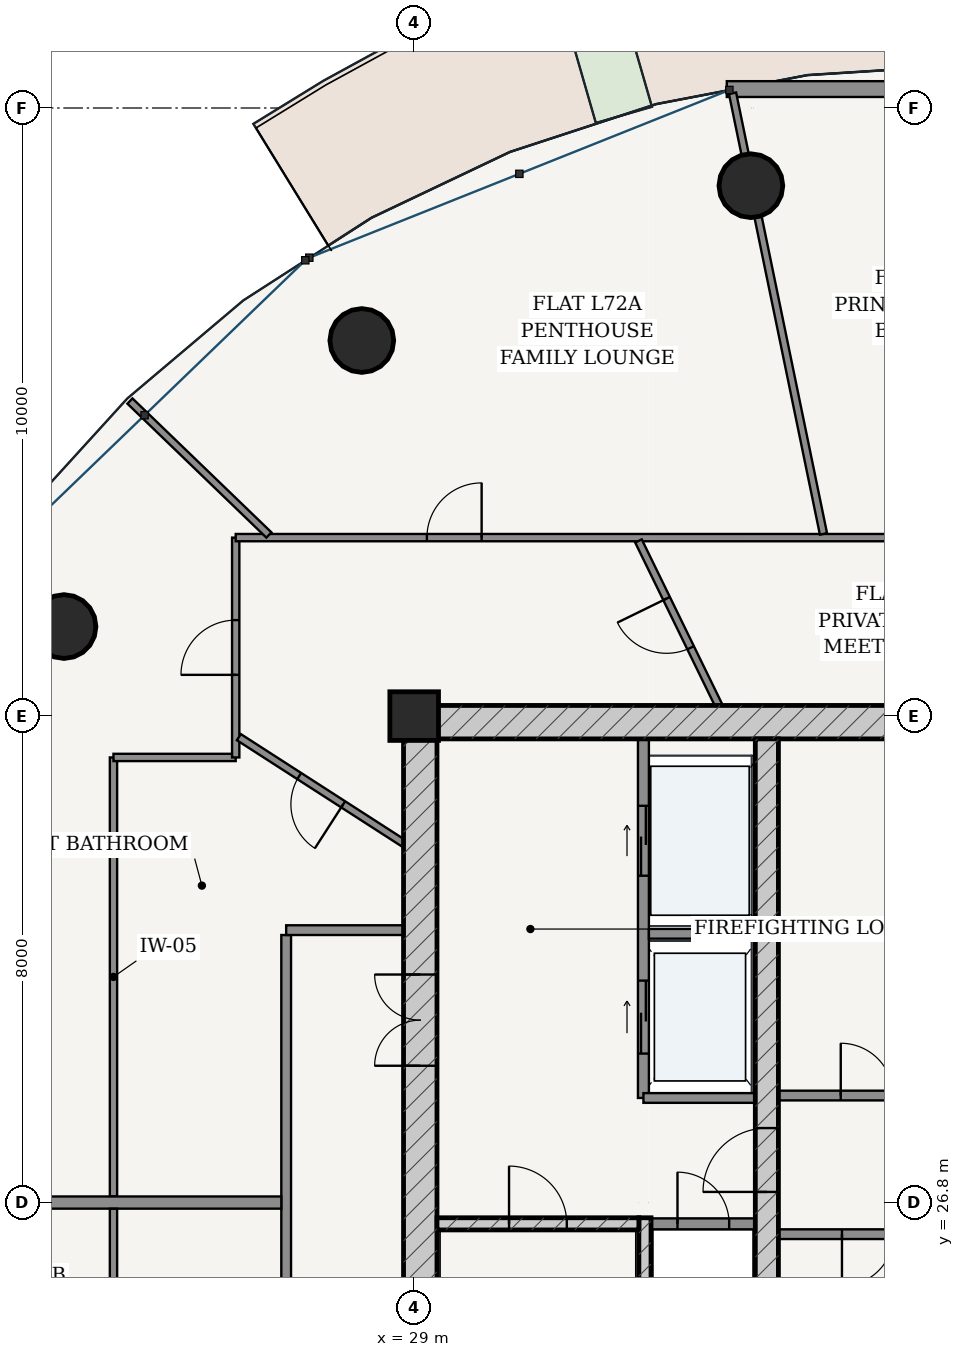
"""IFC4 building model, lengths in metres.
Left out: names, types, materials, properties, quantities, classifications, styles, units other than length and angle.
Written with IfcOpenShell. Run it as: python <this file> out.ifc"""

import sys

from ifc_helpers import new_model, si_unit, direction, frame, frame_2d, origin, origin_2d, place, context, subcontext, project, spatial, rectangle, hollow_circle, extrude, source, transform, mapped, element, fill, save


model = new_model("IFC4")
c1 = context("Model", 3, precision=1e-05, world=origin(), true_north=direction((-0.2419218956, 0.970295726276)))
c2 = subcontext(c1, "Body", "Model", "MODEL_VIEW")
j1 = project(units=[si_unit("LENGTHUNIT", "METRE"), si_unit("PLANEANGLEUNIT", "RADIAN")], contexts=[c1])
p1 = place(None, origin())
s1 = spatial("IfcSite", under=j1, at=p1, CompositionType="ELEMENT")
p2 = place(p1, origin())
s2 = spatial("IfcBuilding", under=s1, at=p2, CompositionType="ELEMENT")
p3 = place(p2, frame((0.0, 0.0, 274.45)))
s3 = spatial("IfcBuildingStorey", under=s2, at=p3, CompositionType="ELEMENT", Elevation=274.45)
p4 = place(p3, frame((29.0, 34.8, 0.0), z_axis=(0.0, 0.0, 1.0), x_axis=(1.0, 0.0, 0.0)))
e1 = element("IfcColumn", 1, at=p4, inside=s3, PredefinedType="COLUMN", context=c2, shape_type="SweptSolid", body=[
    extrude(rectangle(XDim=0.8, YDim=0.8, at=origin_2d()), origin(), (0.0, 0.0, 1.0), 3.75),
])
p5 = place(p3, frame((28.825, 34.7, 0.0), z_axis=(0.0, 0.0, 1.0), x_axis=(1.0, 0.0, 0.0)))
e2 = element("IfcWall", 2, at=p5, inside=s3, PredefinedType="SHEAR", context=c2, shape_type="SweptSolid", body=[
    extrude(rectangle(XDim=18.35, YDim=0.55, at=frame_2d((9.175, 0.0))), origin(), (0.0, 0.0, 1.0), 3.49),
])
p6 = place(p3, frame((29.1, 19.175, 0.0), z_axis=(0.0, 0.0, 1.0), x_axis=(0.0, 1.0, 0.0)))
e3 = element("IfcWall", 3, at=p6, inside=s3, PredefinedType="SHEAR", context=c2, shape_type="SweptSolid", body=[
    extrude(rectangle(XDim=15.25, YDim=0.55, at=frame_2d((7.625, 0.0))), origin(), (0.0, 0.0, 1.0), 3.49),
])
p7 = place(p6, frame((9.875, 0.0, 0.0)))
e4 = element("IfcOpeningElement", 4, at=p7, cuts=e3, PredefinedType="OPENING", context=c2, shape_type="SweptSolid", body=[
    extrude(rectangle(XDim=1.5, YDim=2.2, at=frame_2d((0.75, 1.1))), frame((0.0, 0.285, 0.0), z_axis=(0.0, -1.0, 0.0), x_axis=(1.0, 0.0, 0.0)), (0.0, 0.0, 1.0), 0.57),
])
p8 = place(p3, frame((32.795, 19.175, 0.0), z_axis=(0.0, 0.0, 1.0), x_axis=(0.0, 1.0, 0.0)))
e5 = element("IfcWall", 5, at=p8, inside=s3, PredefinedType="SOLIDWALL", context=c2, shape_type="SweptSolid", body=[
    extrude(rectangle(XDim=7.375, YDim=0.2, at=frame_2d((3.688, 0.0))), origin(), (0.0, 0.0, 1.0), 3.49),
])
p9 = place(p3, frame((29.375, 26.45, 0.0), z_axis=(0.0, 0.0, 1.0), x_axis=(1.0, 0.0, 0.0)))
e6 = element("IfcWall", 6, at=p9, inside=s3, PredefinedType="SOLIDWALL", context=c2, shape_type="SweptSolid", body=[
    extrude(rectangle(XDim=3.32, YDim=0.2, at=frame_2d((1.66, 0.0))), origin(), (0.0, 0.0, 1.0), 3.49),
])
p10 = place(p9, frame((1.185, 0.0, 0.0)))
e7 = element("IfcOpeningElement", 7, at=p10, cuts=e6, PredefinedType="OPENING", context=c2, shape_type="SweptSolid", body=[
    extrude(rectangle(XDim=0.95, YDim=2.15, at=frame_2d((0.475, 1.075))), frame((0.0, 0.11, 0.0), z_axis=(0.0, -1.0, 0.0), x_axis=(1.0, 0.0, 0.0)), (0.0, 0.0, 1.0), 0.22),
])
p11 = place(p3, frame((34.8, 19.175, 0.0), z_axis=(0.0, 0.0, 1.0), x_axis=(0.0, 1.0, 0.0)))
e8 = element("IfcWall", 8, at=p11, inside=s3, PredefinedType="SHEAR", context=c2, shape_type="SweptSolid", body=[
    extrude(rectangle(XDim=15.25, YDim=0.38, at=frame_2d((7.625, 0.0))), origin(), (0.0, 0.0, 1.0), 3.49),
])
p12 = place(p11, frame((7.8, 0.0, 0.0)))
e9 = element("IfcOpeningElement", 9, at=p12, cuts=e8, PredefinedType="OPENING", context=c2, shape_type="SweptSolid", body=[
    extrude(rectangle(XDim=1.05, YDim=2.15, at=frame_2d((0.525, 1.075))), frame((0.0, 0.2, 0.0), z_axis=(0.0, -1.0, 0.0), x_axis=(1.0, 0.0, 0.0)), (0.0, 0.0, 1.0), 0.4),
])
for number, where, z_axis, x_axis in (
    (10, (34.537, 43.522, 0.0), (0.0, 0.0, 1.0), (1.0, 0.0, 0.0)),
    (11, (28.139, 40.977, 0.0), (0.0, 0.0, 1.0), (1.0, 0.0, 0.0)),
    (12, (23.241, 36.272, 0.0), (0.0, 0.0, 1.0), (1.0, 0.0, 0.0)),
):
    element("IfcColumn", number, at=place(p3, frame(where, z_axis=z_axis, x_axis=x_axis)), inside=s3, PredefinedType="COLUMN", context=c2, shape_type="SweptSolid", body=[
        extrude(hollow_circle(Radius=0.525, WallThickness=0.035, at=origin_2d()), origin(), (0.0, 0.0, 1.0), 3.75),
    ])
p13 = place(p3, frame((41.859, 45.111, 0.0), z_axis=(0.0, 0.0, 1.0), x_axis=(-1.0, 0.0, 0.0)))
e13 = element("IfcWall", 13, at=p13, inside=s3, PredefinedType="SOLIDWALL", context=c2, shape_type="SweptSolid", body=[
    extrude(rectangle(XDim=7.718, YDim=0.26, at=frame_2d((3.859, 0.0))), origin(), (0.0, 0.0, 1.0), 3.49),
])
p14 = place(p13, frame((3.184, 0.0, 0.0)))
e14 = element("IfcOpeningElement", 14, at=p14, cuts=e13, PredefinedType="OPENING", context=c2, shape_type="SweptSolid", body=[
    extrude(rectangle(XDim=1.35, YDim=2.2, at=frame_2d((0.675, 1.1))), frame((0.0, 0.14, 0.0), z_axis=(0.0, -1.0, 0.0), x_axis=(1.0, 0.0, 0.0)), (0.0, 0.0, 1.0), 0.28),
])
p15 = place(p3, frame((32.9, 26.45, 0.0), z_axis=(0.0, 0.0, 1.0), x_axis=(1.0, 0.0, 0.0)))
e15 = element("IfcWall", 15, at=p15, inside=s3, PredefinedType="PARTITIONING", context=c2, shape_type="SweptSolid", body=[
    extrude(rectangle(XDim=1.71, YDim=0.18, at=frame_2d((0.855, 0.0))), origin(), (0.0, 0.0, 1.0), 3.49),
])
p16 = place(p15, frame((0.43, 0.0, 0.0)))
e16 = element("IfcOpeningElement", 16, at=p16, cuts=e15, PredefinedType="OPENING", context=c2, shape_type="SweptSolid", body=[
    extrude(rectangle(XDim=0.85, YDim=2.1, at=frame_2d((0.425, 1.05))), frame((0.0, 0.1, 0.0), z_axis=(0.0, -1.0, 0.0), x_axis=(1.0, 0.0, 0.0)), (0.0, 0.0, 1.0), 0.2),
])
p17 = place(p3, frame((32.77, 28.52, 0.0), z_axis=(0.0, 0.0, 1.0), x_axis=(0.0, 1.0, 0.0)))
e17 = element("IfcWall", 17, at=p17, inside=s3, PredefinedType="PARTITIONING", context=c2, shape_type="SweptSolid", body=[
    extrude(rectangle(XDim=5.905, YDim=0.18, at=frame_2d((2.953, 0.0))), origin(), (0.0, 0.0, 1.0), 3.49),
])
p18 = place(p17, frame((3.655, 0.0, 0.0)))
e18 = element("IfcOpeningElement", 18, at=p18, cuts=e17, PredefinedType="OPENING", context=c2, shape_type="SweptSolid", body=[
    extrude(rectangle(XDim=1.15, YDim=2.2, at=frame_2d((0.575, 1.1))), frame((0.0, 0.1, 0.0), z_axis=(0.0, -1.0, 0.0), x_axis=(1.0, 0.0, 0.0)), (0.0, 0.0, 1.0), 0.2),
])
p19 = place(p17, frame((0.73, 0.0, 0.0)))
e19 = element("IfcOpeningElement", 19, at=p19, cuts=e17, PredefinedType="OPENING", context=c2, shape_type="SweptSolid", body=[
    extrude(rectangle(XDim=1.2, YDim=2.25, at=frame_2d((0.6, 1.125))), frame((0.0, 0.1, 0.0), z_axis=(0.0, -1.0, 0.0), x_axis=(1.0, 0.0, 0.0)), (0.0, 0.0, 1.0), 0.2),
])
p20 = place(p3, frame((32.86, 31.22, 0.0), z_axis=(0.0, 0.0, 1.0), x_axis=(1.0, 0.0, 0.0)))
e20 = element("IfcWall", 20, at=p20, inside=s3, PredefinedType="PARTITIONING", context=c2, shape_type="SweptSolid", body=[
    extrude(rectangle(XDim=1.75, YDim=0.16, at=frame_2d((0.875, 0.0))), origin(), (0.0, 0.0, 1.0), 3.49),
])
p21 = place(p3, frame((32.77, 28.52, 0.0), z_axis=(0.0, 0.0, 1.0), x_axis=(1.0, 0.0, 0.0)))
e21 = element("IfcWall", 21, at=p21, inside=s3, PredefinedType="PARTITIONING", context=c2, shape_type="SweptSolid", body=[
    extrude(rectangle(XDim=1.84, YDim=0.16, at=frame_2d((0.92, 0.0))), origin(), (0.0, 0.0, 1.0), 3.49),
])
p22 = place(p3, frame((34.99, 28.56, 0.0), z_axis=(0.0, 0.0, 1.0), x_axis=(1.0, 0.0, 0.0)))
e22 = element("IfcWall", 22, at=p22, inside=s3, PredefinedType="PARTITIONING", context=c2, shape_type="SweptSolid", body=[
    extrude(rectangle(XDim=6.02, YDim=0.16, at=frame_2d((3.01, 0.0))), origin(), (0.0, 0.0, 1.0), 3.49),
])
p23 = place(p22, frame((1.025, 0.0, 0.0)))
e23 = element("IfcOpeningElement", 23, at=p23, cuts=e22, PredefinedType="OPENING", context=c2, shape_type="SweptSolid", body=[
    extrude(rectangle(XDim=0.86, YDim=2.1, at=frame_2d((0.43, 1.05))), frame((0.0, 0.09, 0.0), z_axis=(0.0, -1.0, 0.0), x_axis=(1.0, 0.0, 0.0)), (0.0, 0.0, 1.0), 0.18),
])
p24 = place(p22, frame((4.14, 0.0, 0.0)))
e24 = element("IfcOpeningElement", 24, at=p24, cuts=e22, PredefinedType="OPENING", context=c2, shape_type="SweptSolid", body=[
    extrude(rectangle(XDim=0.85, YDim=2.1, at=frame_2d((0.425, 1.05))), frame((0.0, 0.09, 0.0), z_axis=(0.0, -1.0, 0.0), x_axis=(1.0, 0.0, 0.0)), (0.0, 0.0, 1.0), 0.18),
])
p25 = place(p3, frame((34.99, 26.28, 0.0), z_axis=(0.0, 0.0, 1.0), x_axis=(1.0, 0.0, 0.0)))
e25 = element("IfcWall", 25, at=p25, inside=s3, PredefinedType="PARTITIONING", context=c2, shape_type="SweptSolid", body=[
    extrude(rectangle(XDim=6.02, YDim=0.16, at=frame_2d((3.01, 0.0))), origin(), (0.0, 0.0, 1.0), 3.49),
])
p26 = place(p25, frame((1.045, 0.0, 0.0)))
e26 = element("IfcOpeningElement", 26, at=p26, cuts=e25, PredefinedType="OPENING", context=c2, shape_type="SweptSolid", body=[
    extrude(rectangle(XDim=0.85, YDim=2.1, at=frame_2d((0.425, 1.05))), frame((0.0, 0.09, 0.0), z_axis=(0.0, -1.0, 0.0), x_axis=(1.0, 0.0, 0.0)), (0.0, 0.0, 1.0), 0.18),
])
p27 = place(p25, frame((3.215, 0.0, 0.0)))
e27 = element("IfcOpeningElement", 27, at=p27, cuts=e25, PredefinedType="OPENING", context=c2, shape_type="SweptSolid", body=[
    extrude(rectangle(XDim=1.1, YDim=2.2, at=frame_2d((0.55, 1.1))), frame((0.0, 0.09, 0.0), z_axis=(0.0, -1.0, 0.0), x_axis=(1.0, 0.0, 0.0)), (0.0, 0.0, 1.0), 0.18),
])
p28 = place(p25, frame((4.695, 0.0, 0.0)))
e28 = element("IfcOpeningElement", 28, at=p28, cuts=e25, PredefinedType="OPENING", context=c2, shape_type="SweptSolid", body=[
    extrude(rectangle(XDim=1.1, YDim=2.2, at=frame_2d((0.55, 1.1))), frame((0.0, 0.09, 0.0), z_axis=(0.0, -1.0, 0.0), x_axis=(1.0, 0.0, 0.0)), (0.0, 0.0, 1.0), 0.18),
])
p29 = place(p3, frame((26.895, 17.275, 0.0), z_axis=(0.0, 0.0, 1.0), x_axis=(0.0, 1.0, 0.0)))
e29 = element("IfcWall", 29, at=p29, inside=s3, PredefinedType="PARTITIONING", context=c2, shape_type="SweptSolid", body=[
    extrude(rectangle(XDim=13.925, YDim=0.16, at=frame_2d((6.962, 0.0))), origin(), (0.0, 0.0, 1.0), 3.015),
])
p30 = place(p29, frame((2.735, 0.0, 0.0)))
e30 = element("IfcOpeningElement", 30, at=p30, cuts=e29, PredefinedType="OPENING", context=c2, shape_type="SweptSolid", body=[
    extrude(rectangle(XDim=0.98, YDim=2.2, at=frame_2d((0.49, 1.1))), frame((0.0, 0.09, 0.0), z_axis=(0.0, -1.0, 0.0), x_axis=(1.0, 0.0, 0.0)), (0.0, 0.0, 1.0), 0.18),
])
p31 = place(p3, frame((26.895, 31.28, 0.0), z_axis=(0.0, 0.0, 1.0), x_axis=(1.0, 0.0, 0.0)))
e31 = element("IfcWall", 31, at=p31, inside=s3, PredefinedType="PARTITIONING", context=c2, shape_type="SweptSolid", body=[
    extrude(rectangle(XDim=1.93, YDim=0.16, at=frame_2d((0.965, 0.0))), origin(), (0.0, 0.0, 1.0), 3.49),
])
p32 = place(p3, frame((24.055, 26.902, 0.0), z_axis=(0.0, 0.0, 1.0), x_axis=(0.0, 1.0, 0.0)))
e32 = element("IfcWall", 32, at=p32, inside=s3, PredefinedType="PARTITIONING", context=c2, shape_type="SweptSolid", body=[
    extrude(rectangle(XDim=7.218, YDim=0.12, at=frame_2d((3.609, 0.0))), origin(), (0.0, 0.0, 1.0), 3.015),
])
p33 = place(p3, frame((24.055, 34.12, 0.0), z_axis=(0.0, 0.0, 1.0), x_axis=(1.0, 0.0, 0.0)))
e33 = element("IfcWall", 33, at=p33, inside=s3, PredefinedType="PARTITIONING", context=c2, shape_type="SweptSolid", body=[
    extrude(rectangle(XDim=2.01, YDim=0.12, at=frame_2d((1.005, 0.0))), origin(), (0.0, 0.0, 1.0), 3.209),
])
p34 = place(p3, frame((26.065, 34.12, 0.0), z_axis=(0.0, 0.0, 1.0), x_axis=(0.0, 1.0, 0.0)))
e34 = element("IfcWall", 34, at=p34, inside=s3, PredefinedType="PARTITIONING", context=c2, shape_type="SweptSolid", body=[
    extrude(rectangle(XDim=3.615, YDim=0.12, at=frame_2d((1.808, 0.0))), origin(), (0.0, 0.0, 1.0), 3.015),
])
p35 = place(p34, frame((1.358, 0.0, 0.0)))
e35 = element("IfcOpeningElement", 35, at=p35, cuts=e34, PredefinedType="OPENING", context=c2, shape_type="SweptSolid", body=[
    extrude(rectangle(XDim=0.9, YDim=2.15, at=frame_2d((0.45, 1.075))), frame((0.0, 0.07, 0.0), z_axis=(0.0, -1.0, 0.0), x_axis=(1.0, 0.0, 0.0)), (0.0, 0.0, 1.0), 0.14),
])
p36 = place(p3, frame((26.065, 37.735, 0.0), z_axis=(0.0, 0.0, 1.0), x_axis=(1.0, 0.0, 0.0)))
e36 = element("IfcWall", 36, at=p36, inside=s3, PredefinedType="PARTITIONING", context=c2, shape_type="SweptSolid", body=[
    extrude(rectangle(XDim=23.87, YDim=0.12, at=frame_2d((11.935, 0.0))), origin(), (0.0, 0.0, 1.0), 3.015),
])
p37 = place(p36, frame((18.46, 0.0, 0.0)))
e37 = element("IfcOpeningElement", 37, at=p37, cuts=e36, PredefinedType="OPENING", context=c2, shape_type="SweptSolid", body=[
    extrude(rectangle(XDim=0.9, YDim=2.15, at=frame_2d((0.45, 1.075))), frame((0.0, 0.07, 0.0), z_axis=(0.0, -1.0, 0.0), x_axis=(1.0, 0.0, 0.0)), (0.0, 0.0, 1.0), 0.14),
])
p38 = place(p36, frame((3.144, 0.0, 0.0)))
e38 = element("IfcOpeningElement", 38, at=p38, cuts=e36, PredefinedType="OPENING", context=c2, shape_type="SweptSolid", body=[
    extrude(rectangle(XDim=0.9, YDim=2.15, at=frame_2d((0.45, 1.075))), frame((0.0, 0.07, 0.0), z_axis=(0.0, -1.0, 0.0), x_axis=(1.0, 0.0, 0.0)), (0.0, 0.0, 1.0), 0.14),
])
p39 = place(p3, frame((35.731, 37.796, 0.0), z_axis=(0.0, 0.0, 1.0), x_axis=(-0.202101574245, 0.979364566281, 0.0)))
e39 = element("IfcWall", 39, at=p39, inside=s3, PredefinedType="PARTITIONING", context=c2, shape_type="SweptSolid", body=[
    extrude(rectangle(XDim=7.4, YDim=0.12, at=frame_2d((3.7, 0.0))), origin(), (0.0, 0.0, 1.0), 3.015),
])
p40 = place(p3, frame((26.611, 37.778, 0.0), z_axis=(0.0, 0.0, 1.0), x_axis=(-0.719985652574, 0.693988948102, 0.0)))
e40 = element("IfcWall", 40, at=p40, inside=s3, PredefinedType="PARTITIONING", context=c2, shape_type="SweptSolid", body=[
    extrude(rectangle(XDim=3.174, YDim=0.12, at=frame_2d((1.587, 0.0))), origin(), (0.0, 0.0, 1.0), 3.121),
])
p41 = place(p3, frame((34.008, 34.977, 0.0), z_axis=(0.0, 0.0, 1.0), x_axis=(-0.438717914863, 0.898624833386, 0.0)))
e41 = element("IfcWall", 41, at=p41, inside=s3, PredefinedType="PARTITIONING", context=c2, shape_type="SweptSolid", body=[
    extrude(rectangle(XDim=3.007, YDim=0.12, at=frame_2d((1.504, 0.0))), origin(), (0.0, 0.0, 1.0), 3.49),
])
p42 = place(p41, frame((1.054, 0.0, 0.0)))
e42 = element("IfcOpeningElement", 42, at=p42, cuts=e41, PredefinedType="OPENING", context=c2, shape_type="SweptSolid", body=[
    extrude(rectangle(XDim=0.9, YDim=2.15, at=frame_2d((0.45, 1.075))), frame((0.0, 0.07, 0.0), z_axis=(0.0, -1.0, 0.0), x_axis=(1.0, 0.0, 0.0)), (0.0, 0.0, 1.0), 0.14),
])
p43 = place(p3, frame((28.825, 32.709, 0.0), z_axis=(0.0, 0.0, 1.0), x_axis=(-0.840692964871, 0.541512085568, 0.0)))
e43 = element("IfcWall", 43, at=p43, inside=s3, PredefinedType="PARTITIONING", context=c2, shape_type="SweptSolid", body=[
    extrude(rectangle(XDim=3.221, YDim=0.12, at=frame_2d((1.61, 0.0))), origin(), (0.0, 0.0, 1.0), 3.015),
])
p44 = place(p43, frame((1.18, 0.0, 0.0)))
e44 = element("IfcOpeningElement", 44, at=p44, cuts=e43, PredefinedType="OPENING", context=c2, shape_type="SweptSolid", body=[
    extrude(rectangle(XDim=0.86, YDim=2.15, at=frame_2d((0.43, 1.075))), frame((0.0, 0.07, 0.0), z_axis=(0.0, -1.0, 0.0), x_axis=(1.0, 0.0, 0.0)), (0.0, 0.0, 1.0), 0.14),
])
p45 = place(p3, frame((26.815, 26.8, 0.0), z_axis=(0.0, 0.0, 1.0), x_axis=(-1.0, 0.0, 0.0)))
e45 = element("IfcWall", 45, at=p45, inside=s3, PredefinedType="PARTITIONING", context=c2, shape_type="SweptSolid", body=[
    extrude(rectangle(XDim=8.155, YDim=0.2, at=frame_2d((4.078, 0.0))), origin(), (0.0, 0.0, 1.0), 3.121),
])
p46 = place(p3, frame((24.055, 14.355, 0.0), z_axis=(0.0, 0.0, 1.0), x_axis=(0.0, 1.0, 0.0)))
e46 = element("IfcWall", 46, at=p46, inside=s3, PredefinedType="PARTITIONING", context=c2, shape_type="SweptSolid", body=[
    extrude(rectangle(XDim=12.343, YDim=0.12, at=frame_2d((6.171, 0.0))), origin(), (0.0, 0.0, 1.0), 3.015),
])
p47 = place(p46, frame((5.442, 0.0, 0.0)))
e47 = element("IfcOpeningElement", 47, at=p47, cuts=e46, PredefinedType="OPENING", context=c2, shape_type="SweptSolid", body=[
    extrude(rectangle(XDim=0.9, YDim=2.15, at=frame_2d((0.45, 1.075))), frame((0.0, 0.07, 0.0), z_axis=(0.0, -1.0, 0.0), x_axis=(1.0, 0.0, 0.0)), (0.0, 0.0, 1.0), 0.14),
])
m1 = source(origin(), c2, "Body", "SweptSolid", [
    extrude(rectangle(XDim=1.5, YDim=2.2, at=frame_2d((0.75, 1.1))), frame((0.0, 0.025, 0.0), z_axis=(0.0, -1.0, 0.0), x_axis=(1.0, 0.0, 0.0)), (0.0, 0.0, 1.0), 0.05),
])
p48 = place(p7, origin())
e48 = element("IfcDoor", 48, at=p48, inside=s3, OperationType="DOUBLE_DOOR_SINGLE_SWING", PredefinedType="DOOR", context=c2, shape_type="MappedRepresentation", body=[
    mapped(m1, transform((0.0, 0.0, 0.0), scale=1.0)),
])
fill(e4, e48)
m2 = source(origin(), c2, "Body", "SweptSolid", [
    extrude(rectangle(XDim=1.05, YDim=2.15, at=frame_2d((0.525, 1.075))), frame((0.0, 0.025, 0.0), z_axis=(0.0, -1.0, 0.0), x_axis=(1.0, 0.0, 0.0)), (0.0, 0.0, 1.0), 0.05),
])
p49 = place(p12, origin())
e49 = element("IfcDoor", 49, at=p49, inside=s3, OperationType="SINGLE_SWING_LEFT", PredefinedType="DOOR", context=c2, shape_type="MappedRepresentation", body=[
    mapped(m2, transform((0.0, 0.0, 0.0), scale=1.0)),
])
fill(e9, e49)
m3 = source(origin(), c2, "Body", "SweptSolid", [
    extrude(rectangle(XDim=0.95, YDim=2.15, at=frame_2d((0.475, 1.075))), frame((0.0, 0.025, 0.0), z_axis=(0.0, -1.0, 0.0), x_axis=(1.0, 0.0, 0.0)), (0.0, 0.0, 1.0), 0.05),
])
p50 = place(p10, origin())
e50 = element("IfcDoor", 50, at=p50, inside=s3, OperationType="SINGLE_SWING_LEFT", PredefinedType="DOOR", context=c2, shape_type="MappedRepresentation", body=[
    mapped(m3, transform((0.0, 0.0, 0.0), scale=1.0)),
])
fill(e7, e50)
m4 = source(origin(), c2, "Body", "SweptSolid", [
    extrude(rectangle(XDim=0.85, YDim=2.1, at=frame_2d((0.425, 1.05))), frame((0.0, 0.025, 0.0), z_axis=(0.0, -1.0, 0.0), x_axis=(1.0, 0.0, 0.0)), (0.0, 0.0, 1.0), 0.05),
])
p51 = place(p16, origin())
e51 = element("IfcDoor", 51, at=p51, inside=s3, OperationType="SINGLE_SWING_LEFT", PredefinedType="DOOR", context=c2, shape_type="MappedRepresentation", body=[
    mapped(m4, transform((0.0, 0.0, 0.0), scale=1.0)),
])
fill(e16, e51)
m5 = source(origin(), c2, "Body", "SweptSolid", [
    extrude(rectangle(XDim=0.86, YDim=2.1, at=frame_2d((0.43, 1.05))), frame((0.0, 0.025, 0.0), z_axis=(0.0, -1.0, 0.0), x_axis=(1.0, 0.0, 0.0)), (0.0, 0.0, 1.0), 0.05),
])
p52 = place(p23, origin())
e52 = element("IfcDoor", 52, at=p52, inside=s3, OperationType="SINGLE_SWING_LEFT", PredefinedType="DOOR", context=c2, shape_type="MappedRepresentation", body=[
    mapped(m5, transform((0.0, 0.0, 0.0), scale=1.0)),
])
fill(e23, e52)
p53 = place(p26, frame((0.85, 0.0, 0.0), z_axis=(0.0, 0.0, 1.0), x_axis=(-1.0, 0.0, 0.0)))
e53 = element("IfcDoor", 53, at=p53, inside=s3, OperationType="SINGLE_SWING_RIGHT", PredefinedType="DOOR", context=c2, shape_type="MappedRepresentation", body=[
    mapped(m4, transform((0.0, 0.0, 0.0), scale=1.0)),
])
fill(e26, e53)
m6 = source(origin(), c2, "Body", "SweptSolid", [
    extrude(rectangle(XDim=1.15, YDim=2.2, at=frame_2d((0.575, 1.1))), frame((0.0, 0.025, 0.0), z_axis=(0.0, -1.0, 0.0), x_axis=(1.0, 0.0, 0.0)), (0.0, 0.0, 1.0), 0.05),
])
p54 = place(p18, origin())
e54 = element("IfcDoor", 54, at=p54, inside=s3, OperationType="DOUBLE_DOOR_SLIDING", PredefinedType="DOOR", context=c2, shape_type="MappedRepresentation", body=[
    mapped(m6, transform((0.0, 0.0, 0.0), scale=1.0)),
])
fill(e18, e54)
m7 = source(origin(), c2, "Body", "SweptSolid", [
    extrude(rectangle(XDim=1.2, YDim=2.25, at=frame_2d((0.6, 1.125))), frame((0.0, 0.025, 0.0), z_axis=(0.0, -1.0, 0.0), x_axis=(1.0, 0.0, 0.0)), (0.0, 0.0, 1.0), 0.05),
])
p55 = place(p19, origin())
e55 = element("IfcDoor", 55, at=p55, inside=s3, OperationType="DOUBLE_DOOR_SLIDING", PredefinedType="DOOR", context=c2, shape_type="MappedRepresentation", body=[
    mapped(m7, transform((0.0, 0.0, 0.0), scale=1.0)),
])
fill(e19, e55)
m8 = source(origin(), c2, "Body", "SweptSolid", [
    extrude(rectangle(XDim=0.9, YDim=2.15, at=frame_2d((0.45, 1.075))), frame((0.0, 0.025, 0.0), z_axis=(0.0, -1.0, 0.0), x_axis=(1.0, 0.0, 0.0)), (0.0, 0.0, 1.0), 0.05),
])
p56 = place(p42, origin())
e56 = element("IfcDoor", 56, at=p56, inside=s3, OperationType="SINGLE_SWING_RIGHT", PredefinedType="DOOR", context=c2, shape_type="MappedRepresentation", body=[
    mapped(m8, transform((0.0, 0.0, 0.0), scale=1.0)),
])
fill(e42, e56)
m9 = source(origin(), c2, "Body", "SweptSolid", [
    extrude(rectangle(XDim=0.86, YDim=2.15, at=frame_2d((0.43, 1.075))), frame((0.0, 0.025, 0.0), z_axis=(0.0, -1.0, 0.0), x_axis=(1.0, 0.0, 0.0)), (0.0, 0.0, 1.0), 0.05),
])
p57 = place(p44, origin())
e57 = element("IfcDoor", 57, at=p57, inside=s3, OperationType="SINGLE_SWING_LEFT", PredefinedType="DOOR", context=c2, shape_type="MappedRepresentation", body=[
    mapped(m9, transform((0.0, 0.0, 0.0), scale=1.0)),
])
fill(e44, e57)
p58 = place(p38, origin())
e58 = element("IfcDoor", 58, at=p58, inside=s3, OperationType="SINGLE_SWING_RIGHT", PredefinedType="DOOR", context=c2, shape_type="MappedRepresentation", body=[
    mapped(m8, transform((0.0, 0.0, 0.0), scale=1.0)),
])
fill(e38, e58)
p59 = place(p35, origin())
e59 = element("IfcDoor", 59, at=p59, inside=s3, OperationType="SINGLE_SWING_LEFT", PredefinedType="DOOR", context=c2, shape_type="MappedRepresentation", body=[
    mapped(m8, transform((0.0, 0.0, 0.0), scale=1.0)),
])
fill(e35, e59)
save(model, sys.argv[1])
